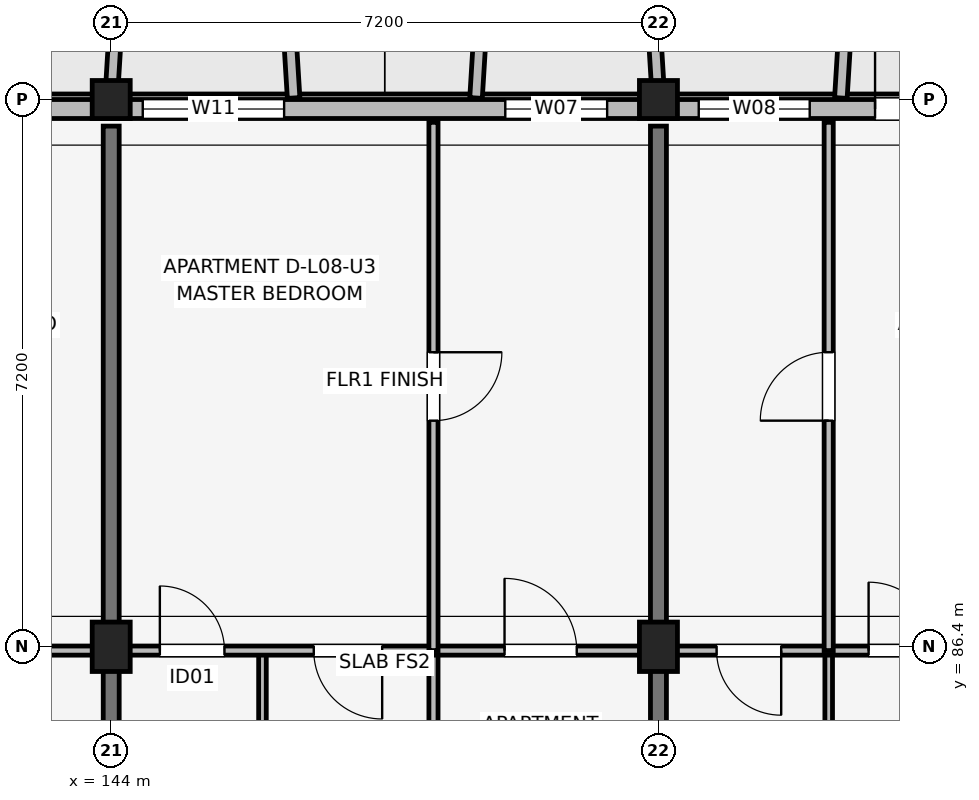
"""IFC4 building model, lengths in metres.
Left out: names, types, materials, properties, quantities, classifications, styles, units other than length and angle.
Written with IfcOpenShell. Run it as: python <this file> out.ifc"""

import sys

from ifc_helpers import new_model, si_unit, direction, frame, frame_2d, origin, origin_2d, place, context, subcontext, project, spatial, rectangle, extrude, element, fill, save


model = new_model("IFC4")
c1 = context("Model", 3, precision=1e-05, world=origin(), true_north=direction((0.0, 1.0)))
c2 = subcontext(c1, "Body", "Model", "MODEL_VIEW")
j1 = project(units=[si_unit("LENGTHUNIT", "METRE"), si_unit("PLANEANGLEUNIT", "RADIAN")], contexts=[c1])
p1 = place(None, origin())
s1 = spatial("IfcSite", under=j1, at=p1, CompositionType="ELEMENT")
p2 = place(p1, origin())
s2 = spatial("IfcBuilding", under=s1, at=p2, CompositionType="ELEMENT")
p3 = place(p2, frame((0.0, 0.0, 27.6)))
s3 = spatial("IfcBuildingStorey", under=s2, at=p3, CompositionType="ELEMENT", Elevation=27.6)
p4 = place(p3, frame((144.0, 86.4, 0.0), z_axis=(0.0, 0.0, 1.0), x_axis=(1.0, 0.0, 0.0)))
e1 = element("IfcColumn", 1, at=p4, inside=s3, PredefinedType="COLUMN", context=c2, shape_type="SweptSolid", body=[
    extrude(rectangle(XDim=0.5, YDim=0.65, at=origin_2d()), origin(), (0.0, 0.0, 1.0), 3.15),
])
p5 = place(p3, frame((144.0, 93.6, 0.0), z_axis=(0.0, 0.0, 1.0), x_axis=(1.0, 0.0, 0.0)))
e2 = element("IfcColumn", 2, at=p5, inside=s3, PredefinedType="COLUMN", context=c2, shape_type="SweptSolid", body=[
    extrude(rectangle(XDim=0.5, YDim=0.5, at=origin_2d()), origin(), (0.0, 0.0, 1.0), 3.15),
])
p6 = place(p3, frame((151.2, 86.4, 0.0), z_axis=(0.0, 0.0, 1.0), x_axis=(1.0, 0.0, 0.0)))
e3 = element("IfcColumn", 3, at=p6, inside=s3, PredefinedType="COLUMN", context=c2, shape_type="SweptSolid", body=[
    extrude(rectangle(XDim=0.5, YDim=0.65, at=origin_2d()), origin(), (0.0, 0.0, 1.0), 3.15),
])
p7 = place(p3, frame((151.2, 93.6, 0.0), z_axis=(0.0, 0.0, 1.0), x_axis=(1.0, 0.0, 0.0)))
e4 = element("IfcColumn", 4, at=p7, inside=s3, PredefinedType="COLUMN", context=c2, shape_type="SweptSolid", body=[
    extrude(rectangle(XDim=0.5, YDim=0.5, at=origin_2d()), origin(), (0.0, 0.0, 1.0), 3.15),
])
for number, where, z_axis, x_axis in (
    (5, (144.0, 83.85, 0.0), (0.0, 0.0, 1.0), (0.0, 1.0, 0.0)),
    (6, (151.2, 83.85, 0.0), (0.0, 0.0, 1.0), (0.0, 1.0, 0.0)),
):
    element("IfcWall", number, at=place(p3, frame(where, z_axis=z_axis, x_axis=x_axis)), inside=s3, PredefinedType="SHEAR", context=c2, shape_type="SweptSolid", body=[
        extrude(rectangle(XDim=9.4, YDim=0.21, at=frame_2d((4.7, 0.0))), origin(), (0.0, 0.0, 1.0), 3.15),
    ])
p8 = place(p3, frame((162.8, 93.475, 0.0), z_axis=(0.0, 0.0, 1.0), x_axis=(-1.0, 0.0, 0.0)))
e7 = element("IfcWall", 7, at=p8, inside=s3, PredefinedType="SOLIDWALL", context=c2, shape_type="SweptSolid", body=[
    extrude(rectangle(XDim=30.4, YDim=0.25, at=frame_2d((15.2, 0.0))), origin(), (0.0, 0.0, 1.0), 2.43),
])
p9 = place(p8, frame((23.225, 0.0, 0.0), z_axis=(0.0, 0.0, 1.0), x_axis=(-1.0, 0.0, 0.0)))
e8 = element("IfcOpeningElement", 8, at=p9, cuts=e7, PredefinedType="OPENING", context=c2, shape_type="SweptSolid", body=[
    extrude(rectangle(XDim=1.65, YDim=2.15, at=frame_2d((0.825, 1.075))), frame((0.0, 0.135, 0.0), z_axis=(0.0, -1.0, 0.0), x_axis=(1.0, 0.0, 0.0)), (0.0, 0.0, 1.0), 0.27),
])
p10 = place(p8, frame((8.75, 0.0, 0.0), z_axis=(0.0, 0.0, 1.0), x_axis=(-1.0, 0.0, 0.0)))
e9 = element("IfcOpeningElement", 9, at=p10, cuts=e7, PredefinedType="OPENING", context=c2, shape_type="SweptSolid", body=[
    extrude(rectangle(XDim=1.5, YDim=2.15, at=frame_2d((0.75, 1.075))), frame((0.0, 0.135, 0.0), z_axis=(0.0, -1.0, 0.0), x_axis=(1.0, 0.0, 0.0)), (0.0, 0.0, 1.0), 0.27),
])
p11 = place(p8, frame((26.545, 0.0, 0.75)))
e10 = element("IfcOpeningElement", 10, at=p11, cuts=e7, PredefinedType="OPENING", context=c2, shape_type="SweptSolid", body=[
    extrude(rectangle(XDim=0.98, YDim=1.45, at=frame_2d((0.49, 0.725))), frame((0.0, 0.135, 0.0), z_axis=(0.0, -1.0, 0.0), x_axis=(1.0, 0.0, 0.0)), (0.0, 0.0, 1.0), 0.27),
])
p12 = place(p8, frame((24.315, 0.0, 0.75)))
e11 = element("IfcOpeningElement", 11, at=p12, cuts=e7, PredefinedType="OPENING", context=c2, shape_type="SweptSolid", body=[
    extrude(rectangle(XDim=1.1, YDim=1.5, at=frame_2d((0.55, 0.75))), frame((0.0, 0.135, 0.0), z_axis=(0.0, -1.0, 0.0), x_axis=(1.0, 0.0, 0.0)), (0.0, 0.0, 1.0), 0.27),
])
p13 = place(p8, frame((16.525, 0.0, 0.7)))
e12 = element("IfcOpeningElement", 12, at=p13, cuts=e7, PredefinedType="OPENING", context=c2, shape_type="SweptSolid", body=[
    extrude(rectangle(XDim=1.86, YDim=1.6, at=frame_2d((0.93, 0.8))), frame((0.0, 0.135, 0.0), z_axis=(0.0, -1.0, 0.0), x_axis=(1.0, 0.0, 0.0)), (0.0, 0.0, 1.0), 0.27),
])
p14 = place(p8, frame((12.275, 0.0, 0.75)))
e13 = element("IfcOpeningElement", 13, at=p14, cuts=e7, PredefinedType="OPENING", context=c2, shape_type="SweptSolid", body=[
    extrude(rectangle(XDim=1.34, YDim=1.55, at=frame_2d((0.67, 0.775))), frame((0.0, 0.135, 0.0), z_axis=(0.0, -1.0, 0.0), x_axis=(1.0, 0.0, 0.0)), (0.0, 0.0, 1.0), 0.27),
])
p15 = place(p8, frame((9.61, 0.0, 0.75)))
e14 = element("IfcOpeningElement", 14, at=p15, cuts=e7, PredefinedType="OPENING", context=c2, shape_type="SweptSolid", body=[
    extrude(rectangle(XDim=1.46, YDim=1.55, at=frame_2d((0.73, 0.775))), frame((0.0, 0.135, 0.0), z_axis=(0.0, -1.0, 0.0), x_axis=(1.0, 0.0, 0.0)), (0.0, 0.0, 1.0), 0.27),
])
p16 = place(p8, frame((2.935, 0.0, 0.75)))
e15 = element("IfcOpeningElement", 15, at=p16, cuts=e7, PredefinedType="OPENING", context=c2, shape_type="SweptSolid", body=[
    extrude(rectangle(XDim=0.6, YDim=1.25, at=frame_2d((0.3, 0.625))), frame((0.0, 0.135, 0.0), z_axis=(0.0, -1.0, 0.0), x_axis=(1.0, 0.0, 0.0)), (0.0, 0.0, 1.0), 0.27),
])
p17 = place(p8, frame((0.725, 0.0, 0.75)))
e16 = element("IfcOpeningElement", 16, at=p17, cuts=e7, PredefinedType="OPENING", context=c2, shape_type="SweptSolid", body=[
    extrude(rectangle(XDim=0.72, YDim=1.35, at=frame_2d((0.36, 0.675))), frame((0.0, 0.135, 0.0), z_axis=(0.0, -1.0, 0.0), x_axis=(1.0, 0.0, 0.0)), (0.0, 0.0, 1.0), 0.27),
])
p18 = place(p3, frame((144.0, 93.62, 0.0), z_axis=(0.0, 0.0, 1.0), x_axis=(0.061170732449, 0.998127317276, 0.0)))
e17 = element("IfcWall", 17, at=p18, inside=s3, PredefinedType="ELEMENTEDWALL", context=c2, shape_type="SweptSolid", body=[
    extrude(rectangle(XDim=1.964, YDim=0.165, at=frame_2d((0.982, 0.0))), origin(), (0.0, 0.0, 1.0), 2.95),
])
for number, where, z_axis, x_axis in (
    (18, (146.4, 93.62, 0.0), (0.0, 0.0, 1.0), (-0.061, 0.998, 0.0)),
    (19, (148.8, 93.62, 0.0), (0.0, 0.0, 1.0), (0.061, 0.998, 0.0)),
):
    element("IfcWall", number, at=place(p3, frame(where, z_axis=z_axis, x_axis=x_axis)), inside=s3, PredefinedType="ELEMENTEDWALL", context=c2, shape_type="SweptSolid", body=[
        extrude(rectangle(XDim=1.964, YDim=0.165, at=frame_2d((0.982, 0.0))), origin(), (0.0, 0.0, 1.0), 2.53),
    ])
p19 = place(p3, frame((151.2, 93.62, 0.0), z_axis=(0.0, 0.0, 1.0), x_axis=(-0.061046865508, 0.998134900808, 0.0)))
e20 = element("IfcWall", 20, at=p19, inside=s3, PredefinedType="ELEMENTEDWALL", context=c2, shape_type="SweptSolid", body=[
    extrude(rectangle(XDim=1.964, YDim=0.165, at=frame_2d((0.982, 0.0))), origin(), (0.0, 0.0, 1.0), 2.95),
])
p20 = place(p3, frame((153.6, 93.62, 0.0), z_axis=(0.0, 0.0, 1.0), x_axis=(0.061046865508, 0.998134900808, 0.0)))
e21 = element("IfcWall", 21, at=p20, inside=s3, PredefinedType="ELEMENTEDWALL", context=c2, shape_type="SweptSolid", body=[
    extrude(rectangle(XDim=1.964, YDim=0.165, at=frame_2d((0.982, 0.0))), origin(), (0.0, 0.0, 1.0), 2.55),
])
p21 = place(p3, frame((136.94, 86.35, 0.0), z_axis=(0.0, 0.0, 1.0), x_axis=(1.0, 0.0, 0.0)))
e22 = element("IfcWall", 22, at=p21, inside=s3, PredefinedType="PARTITIONING", context=c2, shape_type="SweptSolid", body=[
    extrude(rectangle(XDim=6.92, YDim=0.12, at=frame_2d((3.46, 0.0))), origin(), (0.0, 0.0, 1.0), 2.38),
])
p22 = place(p21, frame((1.35, 0.0, 0.0), z_axis=(0.0, 0.0, 1.0), x_axis=(-1.0, 0.0, 0.0)))
e23 = element("IfcOpeningElement", 23, at=p22, cuts=e22, PredefinedType="OPENING", context=c2, shape_type="SweptSolid", body=[
    extrude(rectangle(XDim=0.85, YDim=2.08, at=frame_2d((0.425, 1.04))), frame((0.0, 0.07, 0.0), z_axis=(0.0, -1.0, 0.0), x_axis=(1.0, 0.0, 0.0)), (0.0, 0.0, 1.0), 0.14),
])
p23 = place(p21, frame((2.375, 0.0, 0.0)))
e24 = element("IfcOpeningElement", 24, at=p23, cuts=e22, PredefinedType="OPENING", context=c2, shape_type="SweptSolid", body=[
    extrude(rectangle(XDim=0.9, YDim=2.08, at=frame_2d((0.45, 1.04))), frame((0.0, 0.07, 0.0), z_axis=(0.0, -1.0, 0.0), x_axis=(1.0, 0.0, 0.0)), (0.0, 0.0, 1.0), 0.14),
])
p24 = place(p21, frame((5.835, 0.0, 0.0), z_axis=(0.0, 0.0, 1.0), x_axis=(-1.0, 0.0, 0.0)))
e25 = element("IfcOpeningElement", 25, at=p24, cuts=e22, PredefinedType="OPENING", context=c2, shape_type="SweptSolid", body=[
    extrude(rectangle(XDim=0.95, YDim=2.08, at=frame_2d((0.475, 1.04))), frame((0.0, 0.07, 0.0), z_axis=(0.0, -1.0, 0.0), x_axis=(1.0, 0.0, 0.0)), (0.0, 0.0, 1.0), 0.14),
])
p25 = place(p3, frame((145.99, 83.7, 0.0), z_axis=(0.0, 0.0, 1.0), x_axis=(0.0, 1.0, 0.0)))
e26 = element("IfcWall", 26, at=p25, inside=s3, PredefinedType="PARTITIONING", context=c2, shape_type="SweptSolid", body=[
    extrude(rectangle(XDim=2.65, YDim=0.1, at=frame_2d((1.325, 0.0))), origin(), (0.0, 0.0, 1.0), 2.38),
])
p26 = place(p3, frame((148.24, 83.7, 0.0), z_axis=(0.0, 0.0, 1.0), x_axis=(0.0, 1.0, 0.0)))
e27 = element("IfcWall", 27, at=p26, inside=s3, PredefinedType="PARTITIONING", context=c2, shape_type="SweptSolid", body=[
    extrude(rectangle(XDim=2.65, YDim=0.12, at=frame_2d((1.325, 0.0))), origin(), (0.0, 0.0, 1.0), 2.38),
])
p27 = place(p3, frame((144.14, 86.35, 0.0), z_axis=(0.0, 0.0, 1.0), x_axis=(1.0, 0.0, 0.0)))
e28 = element("IfcWall", 28, at=p27, inside=s3, PredefinedType="PARTITIONING", context=c2, shape_type="SweptSolid", body=[
    extrude(rectangle(XDim=6.92, YDim=0.12, at=frame_2d((3.46, 0.0))), origin(), (0.0, 0.0, 1.0), 2.38),
])
p28 = place(p27, frame((0.5, 0.0, 0.0)))
e29 = element("IfcOpeningElement", 29, at=p28, cuts=e28, PredefinedType="OPENING", context=c2, shape_type="SweptSolid", body=[
    extrude(rectangle(XDim=0.85, YDim=2.08, at=frame_2d((0.425, 1.04))), frame((0.0, 0.07, 0.0), z_axis=(0.0, -1.0, 0.0), x_axis=(1.0, 0.0, 0.0)), (0.0, 0.0, 1.0), 0.14),
])
p29 = place(p27, frame((3.425, 0.0, 0.0), z_axis=(0.0, 0.0, 1.0), x_axis=(-1.0, 0.0, 0.0)))
e30 = element("IfcOpeningElement", 30, at=p29, cuts=e28, PredefinedType="OPENING", context=c2, shape_type="SweptSolid", body=[
    extrude(rectangle(XDim=0.9, YDim=2.08, at=frame_2d((0.45, 1.04))), frame((0.0, 0.07, 0.0), z_axis=(0.0, -1.0, 0.0), x_axis=(1.0, 0.0, 0.0)), (0.0, 0.0, 1.0), 0.14),
])
p30 = place(p27, frame((5.035, 0.0, 0.0)))
e31 = element("IfcOpeningElement", 31, at=p30, cuts=e28, PredefinedType="OPENING", context=c2, shape_type="SweptSolid", body=[
    extrude(rectangle(XDim=0.95, YDim=2.08, at=frame_2d((0.475, 1.04))), frame((0.0, 0.07, 0.0), z_axis=(0.0, -1.0, 0.0), x_axis=(1.0, 0.0, 0.0)), (0.0, 0.0, 1.0), 0.14),
])
p31 = place(p3, frame((148.24, 86.35, 0.0), z_axis=(0.0, 0.0, 1.0), x_axis=(0.0, 1.0, 0.0)))
e32 = element("IfcWall", 32, at=p31, inside=s3, PredefinedType="PARTITIONING", context=c2, shape_type="SweptSolid", body=[
    extrude(rectangle(XDim=6.95, YDim=0.12, at=frame_2d((3.475, 0.0))), origin(), (0.0, 0.0, 1.0), 2.38),
])
p32 = place(p31, frame((3.925, 0.0, 0.0), z_axis=(0.0, 0.0, 1.0), x_axis=(-1.0, 0.0, 0.0)))
e33 = element("IfcOpeningElement", 33, at=p32, cuts=e32, PredefinedType="OPENING", context=c2, shape_type="SweptSolid", body=[
    extrude(rectangle(XDim=0.9, YDim=2.08, at=frame_2d((0.45, 1.04))), frame((0.0, 0.07, 0.0), z_axis=(0.0, -1.0, 0.0), x_axis=(1.0, 0.0, 0.0)), (0.0, 0.0, 1.0), 0.14),
])
p33 = place(p3, frame((153.44, 83.7, 0.0), z_axis=(0.0, 0.0, 1.0), x_axis=(0.0, 1.0, 0.0)))
e34 = element("IfcWall", 34, at=p33, inside=s3, PredefinedType="PARTITIONING", context=c2, shape_type="SweptSolid", body=[
    extrude(rectangle(XDim=2.65, YDim=0.1, at=frame_2d((1.325, 0.0))), origin(), (0.0, 0.0, 1.0), 2.38),
])
p34 = place(p3, frame((151.34, 86.35, 0.0), z_axis=(0.0, 0.0, 1.0), x_axis=(1.0, 0.0, 0.0)))
e35 = element("IfcWall", 35, at=p34, inside=s3, PredefinedType="PARTITIONING", context=c2, shape_type="SweptSolid", body=[
    extrude(rectangle(XDim=6.92, YDim=0.12, at=frame_2d((3.46, 0.0))), origin(), (0.0, 0.0, 1.0), 2.38),
])
p35 = place(p34, frame((1.475, 0.0, 0.0), z_axis=(0.0, 0.0, 1.0), x_axis=(-1.0, 0.0, 0.0)))
e36 = element("IfcOpeningElement", 36, at=p35, cuts=e35, PredefinedType="OPENING", context=c2, shape_type="SweptSolid", body=[
    extrude(rectangle(XDim=0.85, YDim=2.08, at=frame_2d((0.425, 1.04))), frame((0.0, 0.07, 0.0), z_axis=(0.0, -1.0, 0.0), x_axis=(1.0, 0.0, 0.0)), (0.0, 0.0, 1.0), 0.14),
])
p36 = place(p34, frame((2.625, 0.0, 0.0)))
e37 = element("IfcOpeningElement", 37, at=p36, cuts=e35, PredefinedType="OPENING", context=c2, shape_type="SweptSolid", body=[
    extrude(rectangle(XDim=0.9, YDim=2.08, at=frame_2d((0.45, 1.04))), frame((0.0, 0.07, 0.0), z_axis=(0.0, -1.0, 0.0), x_axis=(1.0, 0.0, 0.0)), (0.0, 0.0, 1.0), 0.14),
])
p37 = place(p34, frame((5.96, 0.0, 0.0), z_axis=(0.0, 0.0, 1.0), x_axis=(-1.0, 0.0, 0.0)))
e38 = element("IfcOpeningElement", 38, at=p37, cuts=e35, PredefinedType="OPENING", context=c2, shape_type="SweptSolid", body=[
    extrude(rectangle(XDim=0.95, YDim=2.08, at=frame_2d((0.475, 1.04))), frame((0.0, 0.07, 0.0), z_axis=(0.0, -1.0, 0.0), x_axis=(1.0, 0.0, 0.0)), (0.0, 0.0, 1.0), 0.14),
])
p38 = place(p3, frame((153.44, 86.35, 0.0), z_axis=(0.0, 0.0, 1.0), x_axis=(0.0, 1.0, 0.0)))
e39 = element("IfcWall", 39, at=p38, inside=s3, PredefinedType="PARTITIONING", context=c2, shape_type="SweptSolid", body=[
    extrude(rectangle(XDim=6.95, YDim=0.12, at=frame_2d((3.475, 0.0))), origin(), (0.0, 0.0, 1.0), 2.38),
])
p39 = place(p38, frame((3.025, 0.0, 0.0)))
e40 = element("IfcOpeningElement", 40, at=p39, cuts=e39, PredefinedType="OPENING", context=c2, shape_type="SweptSolid", body=[
    extrude(rectangle(XDim=0.9, YDim=2.08, at=frame_2d((0.45, 1.04))), frame((0.0, 0.07, 0.0), z_axis=(0.0, -1.0, 0.0), x_axis=(1.0, 0.0, 0.0)), (0.0, 0.0, 1.0), 0.14),
])
p40 = place(p10, origin())
e41 = element("IfcDoor", 41, at=p40, inside=s3, OperationType="SINGLE_SWING_RIGHT", PredefinedType="DOOR", context=c2, shape_type="SweptSolid", body=[
    extrude(rectangle(XDim=1.5, YDim=2.15, at=frame_2d((0.75, 1.075))), frame((0.0, 0.025, 0.0), z_axis=(0.0, -1.0, 0.0), x_axis=(1.0, 0.0, 0.0)), (0.0, 0.0, 1.0), 0.05),
])
fill(e9, e41)
p41 = place(p13, origin())
e42 = element("IfcWindow", 42, at=p41, inside=s3, PartitioningType="SINGLE_PANEL", PredefinedType="WINDOW", context=c2, shape_type="SweptSolid", body=[
    extrude(rectangle(XDim=1.86, YDim=1.6, at=frame_2d((0.93, 0.8))), frame((0.0, 0.03, 0.0), z_axis=(0.0, -1.0, 0.0), x_axis=(1.0, 0.0, 0.0)), (0.0, 0.0, 1.0), 0.06),
])
fill(e12, e42)
p42 = place(p14, origin())
e43 = element("IfcWindow", 43, at=p42, inside=s3, PartitioningType="SINGLE_PANEL", PredefinedType="WINDOW", context=c2, shape_type="SweptSolid", body=[
    extrude(rectangle(XDim=1.34, YDim=1.55, at=frame_2d((0.67, 0.775))), frame((0.0, 0.03, 0.0), z_axis=(0.0, -1.0, 0.0), x_axis=(1.0, 0.0, 0.0)), (0.0, 0.0, 1.0), 0.06),
])
fill(e13, e43)
p43 = place(p15, origin())
e44 = element("IfcWindow", 44, at=p43, inside=s3, PartitioningType="SINGLE_PANEL", PredefinedType="WINDOW", context=c2, shape_type="SweptSolid", body=[
    extrude(rectangle(XDim=1.46, YDim=1.55, at=frame_2d((0.73, 0.775))), frame((0.0, 0.03, 0.0), z_axis=(0.0, -1.0, 0.0), x_axis=(1.0, 0.0, 0.0)), (0.0, 0.0, 1.0), 0.06),
])
fill(e14, e44)
p44 = place(p28, origin())
e45 = element("IfcDoor", 45, at=p44, inside=s3, OperationType="SINGLE_SWING_LEFT", PredefinedType="DOOR", context=c2, shape_type="SweptSolid", body=[
    extrude(rectangle(XDim=0.85, YDim=2.08, at=frame_2d((0.425, 1.04))), frame((0.0, 0.025, 0.0), z_axis=(0.0, -1.0, 0.0), x_axis=(1.0, 0.0, 0.0)), (0.0, 0.0, 1.0), 0.05),
])
fill(e29, e45)
p45 = place(p29, origin())
e46 = element("IfcDoor", 46, at=p45, inside=s3, OperationType="SINGLE_SWING_RIGHT", PredefinedType="DOOR", context=c2, shape_type="SweptSolid", body=[
    extrude(rectangle(XDim=0.9, YDim=2.08, at=frame_2d((0.45, 1.04))), frame((0.0, 0.025, 0.0), z_axis=(0.0, -1.0, 0.0), x_axis=(1.0, 0.0, 0.0)), (0.0, 0.0, 1.0), 0.05),
])
fill(e30, e46)
p46 = place(p30, origin())
e47 = element("IfcDoor", 47, at=p46, inside=s3, OperationType="SINGLE_SWING_LEFT", PredefinedType="DOOR", context=c2, shape_type="SweptSolid", body=[
    extrude(rectangle(XDim=0.95, YDim=2.08, at=frame_2d((0.475, 1.04))), frame((0.0, 0.025, 0.0), z_axis=(0.0, -1.0, 0.0), x_axis=(1.0, 0.0, 0.0)), (0.0, 0.0, 1.0), 0.05),
])
fill(e31, e47)
p47 = place(p32, origin())
e48 = element("IfcDoor", 48, at=p47, inside=s3, OperationType="SINGLE_SWING_RIGHT", PredefinedType="DOOR", context=c2, shape_type="SweptSolid", body=[
    extrude(rectangle(XDim=0.9, YDim=2.08, at=frame_2d((0.45, 1.04))), frame((0.0, 0.025, 0.0), z_axis=(0.0, -1.0, 0.0), x_axis=(1.0, 0.0, 0.0)), (0.0, 0.0, 1.0), 0.05),
])
fill(e33, e48)
p48 = place(p35, origin())
e49 = element("IfcDoor", 49, at=p48, inside=s3, OperationType="SINGLE_SWING_RIGHT", PredefinedType="DOOR", context=c2, shape_type="SweptSolid", body=[
    extrude(rectangle(XDim=0.85, YDim=2.08, at=frame_2d((0.425, 1.04))), frame((0.0, 0.025, 0.0), z_axis=(0.0, -1.0, 0.0), x_axis=(1.0, 0.0, 0.0)), (0.0, 0.0, 1.0), 0.05),
])
fill(e36, e49)
p49 = place(p36, origin())
e50 = element("IfcDoor", 50, at=p49, inside=s3, OperationType="SINGLE_SWING_LEFT", PredefinedType="DOOR", context=c2, shape_type="SweptSolid", body=[
    extrude(rectangle(XDim=0.9, YDim=2.08, at=frame_2d((0.45, 1.04))), frame((0.0, 0.025, 0.0), z_axis=(0.0, -1.0, 0.0), x_axis=(1.0, 0.0, 0.0)), (0.0, 0.0, 1.0), 0.05),
])
fill(e37, e50)
p50 = place(p39, origin())
e51 = element("IfcDoor", 51, at=p50, inside=s3, OperationType="SINGLE_SWING_LEFT", PredefinedType="DOOR", context=c2, shape_type="SweptSolid", body=[
    extrude(rectangle(XDim=0.9, YDim=2.08, at=frame_2d((0.45, 1.04))), frame((0.0, 0.025, 0.0), z_axis=(0.0, -1.0, 0.0), x_axis=(1.0, 0.0, 0.0)), (0.0, 0.0, 1.0), 0.05),
])
fill(e40, e51)
save(model, sys.argv[1])
